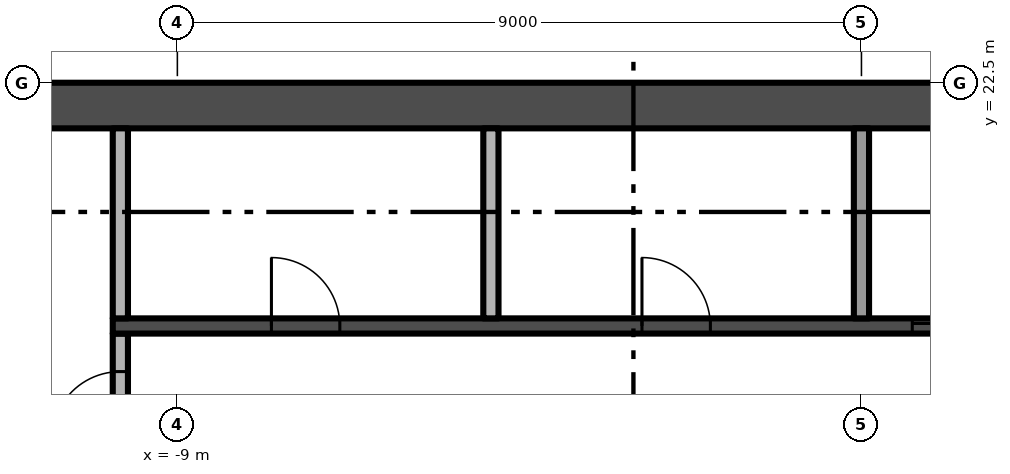
"""IFC4 building model, lengths in metres.
Left out: names, types, materials, properties, quantities, classifications, styles, units other than length and angle.
Written with IfcOpenShell. Run it as: python <this file> out.ifc"""

import sys

from ifc_helpers import new_model, si_unit, direction, frame, frame_2d, origin, place, context, subcontext, project, spatial, rectangle, extrude, element, fill, save


model = new_model("IFC4")
c1 = context("Model", 3, precision=1e-05, world=origin(), true_north=direction((0.0, 1.0)))
c2 = subcontext(c1, "Body", "Model", "MODEL_VIEW")
j1 = project(units=[si_unit("LENGTHUNIT", "METRE"), si_unit("PLANEANGLEUNIT", "RADIAN")], contexts=[c1])
p1 = place(None, origin())
s1 = spatial("IfcSite", under=j1, at=p1, CompositionType="ELEMENT")
p2 = place(p1, origin())
s2 = spatial("IfcBuilding", under=s1, at=p2, CompositionType="ELEMENT")
p3 = place(p2, frame((0.0, 0.0, 203.4)))
s3 = spatial("IfcBuildingStorey", under=s2, at=p3, CompositionType="ELEMENT", Elevation=203.4)
p4 = place(p3, frame((13.5, 22.2, -0.3), z_axis=(0.0, 0.0, 1.0), x_axis=(-1.0, 0.0, 0.0)))
e1 = element("IfcWall", 1, at=p4, inside=s3, PredefinedType="SHEAR", context=c2, shape_type="SweptSolid", body=[
    extrude(rectangle(XDim=27.0, YDim=0.6, at=frame_2d((13.5, 0.0))), origin(), (0.0, 0.0, 1.0), 3.8),
])
p5 = place(p3, frame((-9.75, 17.8, 0.0), z_axis=(0.0, 0.0, 1.0), x_axis=(0.0, 1.0, 0.0)))
e2 = element("IfcWall", 2, at=p5, inside=s3, PredefinedType="PARTITIONING", context=c2, shape_type="SweptSolid", body=[
    extrude(rectangle(XDim=1.4, YDim=0.2, at=frame_2d((0.7, 0.0))), origin(), (0.0, 0.0, 1.0), 3.5),
])
p6 = place(p5, origin())
e3 = element("IfcOpeningElement", 3, at=p6, cuts=e2, PredefinedType="OPENING", context=c2, shape_type="SweptSolid", body=[
    extrude(rectangle(XDim=0.9, YDim=2.1, at=frame_2d((0.45, 1.05))), frame((0.0, 0.11, 0.0), z_axis=(0.0, -1.0, 0.0), x_axis=(1.0, 0.0, 0.0)), (0.0, 0.0, 1.0), 0.22),
])
p7 = place(p3, frame((-9.85, 19.3, 0.0), z_axis=(0.0, 0.0, 1.0), x_axis=(1.0, 0.0, 0.0)))
e4 = element("IfcWall", 4, at=p7, inside=s3, PredefinedType="SHEAR", context=c2, shape_type="SweptSolid", body=[
    extrude(rectangle(XDim=19.7, YDim=0.2, at=frame_2d((9.85, 0.0))), origin(), (0.0, 0.0, 1.0), 3.5),
])
p8 = place(p7, frame((10.519, 0.0, 0.0)))
e5 = element("IfcOpeningElement", 5, at=p8, cuts=e4, PredefinedType="OPENING", context=c2, shape_type="SweptSolid", body=[
    extrude(rectangle(XDim=1.1, YDim=2.1, at=frame_2d((0.55, 1.05))), frame((0.0, 0.11, 0.0), z_axis=(0.0, -1.0, 0.0), x_axis=(1.0, 0.0, 0.0)), (0.0, 0.0, 1.0), 0.22),
])
p9 = place(p7, frame((12.956, 0.0, 0.0)))
e6 = element("IfcOpeningElement", 6, at=p9, cuts=e4, PredefinedType="OPENING", context=c2, shape_type="SweptSolid", body=[
    extrude(rectangle(XDim=1.1, YDim=2.1, at=frame_2d((0.55, 1.05))), frame((0.0, 0.11, 0.0), z_axis=(0.0, -1.0, 0.0), x_axis=(1.0, 0.0, 0.0)), (0.0, 0.0, 1.0), 0.22),
])
p10 = place(p7, frame((15.394, 0.0, 0.0)))
e7 = element("IfcOpeningElement", 7, at=p10, cuts=e4, PredefinedType="OPENING", context=c2, shape_type="SweptSolid", body=[
    extrude(rectangle(XDim=1.1, YDim=2.1, at=frame_2d((0.55, 1.05))), frame((0.0, 0.11, 0.0), z_axis=(0.0, -1.0, 0.0), x_axis=(1.0, 0.0, 0.0)), (0.0, 0.0, 1.0), 0.22),
])
p11 = place(p7, frame((17.831, 0.0, 0.0)))
e8 = element("IfcOpeningElement", 8, at=p11, cuts=e4, PredefinedType="OPENING", context=c2, shape_type="SweptSolid", body=[
    extrude(rectangle(XDim=1.1, YDim=2.1, at=frame_2d((0.55, 1.05))), frame((0.0, 0.11, 0.0), z_axis=(0.0, -1.0, 0.0), x_axis=(1.0, 0.0, 0.0)), (0.0, 0.0, 1.0), 0.22),
])
p12 = place(p7, frame((2.087, 0.0, 0.0)))
e9 = element("IfcOpeningElement", 9, at=p12, cuts=e4, PredefinedType="OPENING", context=c2, shape_type="SweptSolid", body=[
    extrude(rectangle(XDim=0.9, YDim=2.1, at=frame_2d((0.45, 1.05))), frame((0.0, 0.11, 0.0), z_axis=(0.0, -1.0, 0.0), x_axis=(1.0, 0.0, 0.0)), (0.0, 0.0, 1.0), 0.22),
])
p13 = place(p7, frame((6.963, 0.0, 0.0)))
e10 = element("IfcOpeningElement", 10, at=p13, cuts=e4, PredefinedType="OPENING", context=c2, shape_type="SweptSolid", body=[
    extrude(rectangle(XDim=0.9, YDim=2.1, at=frame_2d((0.45, 1.05))), frame((0.0, 0.11, 0.0), z_axis=(0.0, -1.0, 0.0), x_axis=(1.0, 0.0, 0.0)), (0.0, 0.0, 1.0), 0.22),
])
for number, where, z_axis, x_axis in (
    (11, (-9.75, 19.4, 0.0), (0.0, 0.0, 1.0), (0.0, 1.0, 0.0)),
    (12, (-4.875, 19.4, 0.0), (0.0, 0.0, 1.0), (0.0, 1.0, 0.0)),
    (13, (0.0, 19.4, 0.0), (0.0, 0.0, 1.0), (0.0, 1.0, 0.0)),
):
    element("IfcWall", number, at=place(p3, frame(where, z_axis=z_axis, x_axis=x_axis)), inside=s3, PredefinedType="PARTITIONING", context=c2, shape_type="SweptSolid", body=[
        extrude(rectangle(XDim=2.5, YDim=0.2, at=frame_2d((1.25, 0.0))), origin(), (0.0, 0.0, 1.0), 3.5),
    ])
p14 = place(p8, origin())
e14 = element("IfcDoor", 14, at=p14, inside=s3, OperationType="SLIDING_TO_RIGHT", PredefinedType="DOOR", context=c2, shape_type="SweptSolid", body=[
    extrude(rectangle(XDim=1.1, YDim=2.1, at=frame_2d((0.55, 1.05))), frame((0.0, 0.025, 0.0), z_axis=(0.0, -1.0, 0.0), x_axis=(1.0, 0.0, 0.0)), (0.0, 0.0, 1.0), 0.05),
])
fill(e5, e14)
p15 = place(p6, origin())
e15 = element("IfcDoor", 15, at=p15, inside=s3, OperationType="SINGLE_SWING_LEFT", PredefinedType="DOOR", context=c2, shape_type="SweptSolid", body=[
    extrude(rectangle(XDim=0.9, YDim=2.1, at=frame_2d((0.45, 1.05))), frame((0.0, 0.025, 0.0), z_axis=(0.0, -1.0, 0.0), x_axis=(1.0, 0.0, 0.0)), (0.0, 0.0, 1.0), 0.05),
])
fill(e3, e15)
p16 = place(p12, origin())
e16 = element("IfcDoor", 16, at=p16, inside=s3, OperationType="SINGLE_SWING_LEFT", PredefinedType="DOOR", context=c2, shape_type="SweptSolid", body=[
    extrude(rectangle(XDim=0.9, YDim=2.1, at=frame_2d((0.45, 1.05))), frame((0.0, 0.025, 0.0), z_axis=(0.0, -1.0, 0.0), x_axis=(1.0, 0.0, 0.0)), (0.0, 0.0, 1.0), 0.05),
])
fill(e9, e16)
p17 = place(p13, origin())
e17 = element("IfcDoor", 17, at=p17, inside=s3, OperationType="SINGLE_SWING_LEFT", PredefinedType="DOOR", context=c2, shape_type="SweptSolid", body=[
    extrude(rectangle(XDim=0.9, YDim=2.1, at=frame_2d((0.45, 1.05))), frame((0.0, 0.025, 0.0), z_axis=(0.0, -1.0, 0.0), x_axis=(1.0, 0.0, 0.0)), (0.0, 0.0, 1.0), 0.05),
])
fill(e10, e17)
save(model, sys.argv[1])
